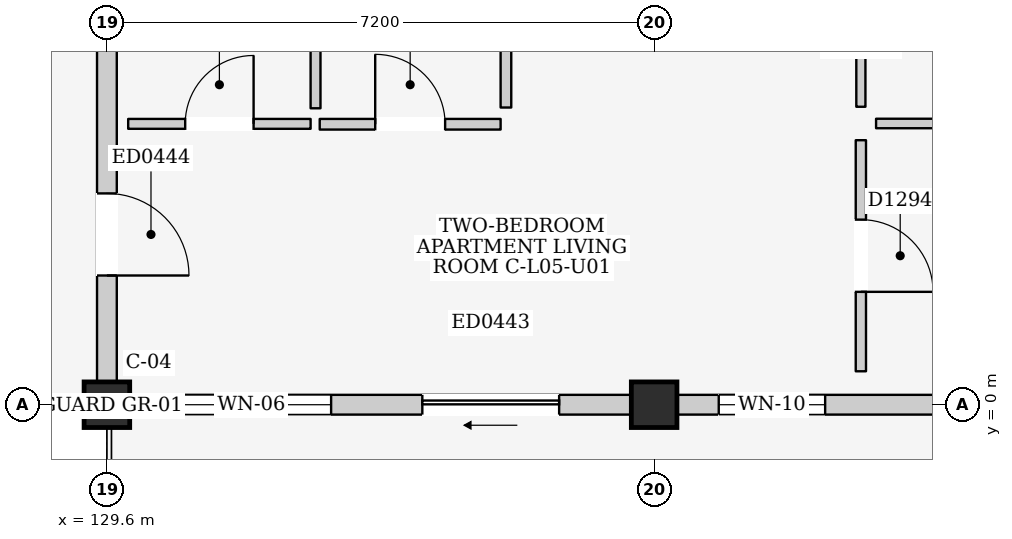
"""IFC4 building model, lengths in metres.
Left out: names, types, materials, properties, quantities, classifications, styles, units other than length and angle.
Written with IfcOpenShell. Run it as: python <this file> out.ifc"""

import sys

from ifc_helpers import new_model, si_unit, direction, frame, frame_2d, origin, origin_2d, place, context, subcontext, project, spatial, rectangle, extrude, element, fill, save


model = new_model("IFC4")
c1 = context("Model", 3, precision=1e-05, world=origin(), true_north=direction((0.0, 1.0)))
c2 = subcontext(c1, "Body", "Model", "MODEL_VIEW")
j1 = project(units=[si_unit("LENGTHUNIT", "METRE"), si_unit("PLANEANGLEUNIT", "RADIAN")], contexts=[c1])
p1 = place(None, origin())
s1 = spatial("IfcSite", under=j1, at=p1, CompositionType="ELEMENT")
p2 = place(p1, origin())
s2 = spatial("IfcBuilding", under=s1, at=p2, CompositionType="ELEMENT")
p3 = place(p2, frame((0.0, 0.0, 18.6)))
s3 = spatial("IfcBuildingStorey", under=s2, at=p3, CompositionType="ELEMENT", Elevation=18.6)
for number, where, z_axis, x_axis in (
    (1, (129.6, 0.0, 0.0), (0.0, 0.0, 1.0), (1.0, 0.0, 0.0)),
    (2, (136.8, 0.0, 0.0), (0.0, 0.0, 1.0), (1.0, 0.0, 0.0)),
):
    element("IfcColumn", number, at=place(p3, frame(where, z_axis=z_axis, x_axis=x_axis)), inside=s3, PredefinedType="COLUMN", context=c2, shape_type="SweptSolid", body=[
        extrude(rectangle(XDim=0.6, YDim=0.6, at=origin_2d()), origin(), (0.0, 0.0, 1.0), 3.3),
    ])
p4 = place(p3, frame((129.9, 0.0, 0.0), z_axis=(0.0, 0.0, 1.0), x_axis=(1.0, 0.0, 0.0)))
e3 = element("IfcWall", 3, at=p4, inside=s3, PredefinedType="ELEMENTEDWALL", context=c2, shape_type="SweptSolid", body=[
    extrude(rectangle(XDim=6.6, YDim=0.26, at=frame_2d((3.3, 0.0))), origin(), (0.0, 0.0, 1.0), 2.595),
])
p5 = place(p4, frame((3.85, 0.0, 0.0)))
e4 = element("IfcOpeningElement", 4, at=p5, cuts=e3, PredefinedType="OPENING", context=c2, shape_type="SweptSolid", body=[
    extrude(rectangle(XDim=1.8, YDim=2.12, at=frame_2d((0.9, 1.06))), frame((0.0, 0.145, 0.0), z_axis=(0.0, -1.0, 0.0), x_axis=(1.0, 0.0, 0.0)), (0.0, 0.0, 1.0), 0.29),
])
p6 = place(p4, frame((0.55, 0.0, 0.835)))
e5 = element("IfcOpeningElement", 5, at=p6, cuts=e3, PredefinedType="OPENING", context=c2, shape_type="SweptSolid", body=[
    extrude(rectangle(XDim=2.1, YDim=1.65, at=frame_2d((1.05, 0.825))), frame((0.0, 0.145, 0.0), z_axis=(0.0, -1.0, 0.0), x_axis=(1.0, 0.0, 0.0)), (0.0, 0.0, 1.0), 0.29),
])
p7 = place(p3, frame((129.6, 0.3, 0.0), z_axis=(0.0, 0.0, 1.0), x_axis=(0.0, 1.0, 0.0)))
e6 = element("IfcWall", 6, at=p7, inside=s3, PredefinedType="ELEMENTEDWALL", context=c2, shape_type="SweptSolid", body=[
    extrude(rectangle(XDim=6.6, YDim=0.26, at=frame_2d((3.3, 0.0))), origin(), (0.0, 0.0, 1.0), 2.545),
])
p8 = place(p7, frame((1.4, 0.0, 0.0)))
e7 = element("IfcOpeningElement", 7, at=p8, cuts=e6, PredefinedType="OPENING", context=c2, shape_type="SweptSolid", body=[
    extrude(rectangle(XDim=1.08, YDim=2.12, at=frame_2d((0.54, 1.06))), frame((0.0, 0.145, 0.0), z_axis=(0.0, -1.0, 0.0), x_axis=(1.0, 0.0, 0.0)), (0.0, 0.0, 1.0), 0.29),
])
p9 = place(p7, frame((4.4, 0.0, 0.95)))
e8 = element("IfcOpeningElement", 8, at=p9, cuts=e6, PredefinedType="OPENING", context=c2, shape_type="SweptSolid", body=[
    extrude(rectangle(XDim=1.2, YDim=1.35, at=frame_2d((0.6, 0.675))), frame((0.0, 0.145, 0.0), z_axis=(0.0, -1.0, 0.0), x_axis=(1.0, 0.0, 0.0)), (0.0, 0.0, 1.0), 0.29),
])
p10 = place(p3, frame((137.1, 0.0, 0.0), z_axis=(0.0, 0.0, 1.0), x_axis=(1.0, 0.0, 0.0)))
e9 = element("IfcWall", 9, at=p10, inside=s3, PredefinedType="ELEMENTEDWALL", context=c2, shape_type="SweptSolid", body=[
    extrude(rectangle(XDim=6.6, YDim=0.26, at=frame_2d((3.3, 0.0))), origin(), (0.0, 0.0, 1.0), 2.595),
])
p11 = place(p10, frame((3.85, 0.0, 0.0)))
e10 = element("IfcOpeningElement", 10, at=p11, cuts=e9, PredefinedType="OPENING", context=c2, shape_type="SweptSolid", body=[
    extrude(rectangle(XDim=1.6, YDim=2.12, at=frame_2d((0.8, 1.06))), frame((0.0, 0.145, 0.0), z_axis=(0.0, -1.0, 0.0), x_axis=(1.0, 0.0, 0.0)), (0.0, 0.0, 1.0), 0.29),
])
p12 = place(p10, frame((0.55, 0.0, 0.9)))
e11 = element("IfcOpeningElement", 11, at=p12, cuts=e9, PredefinedType="OPENING", context=c2, shape_type="SweptSolid", body=[
    extrude(rectangle(XDim=1.4, YDim=1.2, at=frame_2d((0.7, 0.6))), frame((0.0, 0.145, 0.0), z_axis=(0.0, -1.0, 0.0), x_axis=(1.0, 0.0, 0.0)), (0.0, 0.0, 1.0), 0.29),
])
p13 = place(p3, frame((129.88, 3.695, 0.0), z_axis=(0.0, 0.0, 1.0), x_axis=(1.0, 0.0, 0.0)))
e12 = element("IfcWall", 12, at=p13, inside=s3, PredefinedType="PARTITIONING", context=c2, shape_type="SweptSolid", body=[
    extrude(rectangle(XDim=2.4, YDim=0.13, at=frame_2d((1.2, 0.0))), origin(), (0.0, 0.0, 1.0), 3.06),
])
p14 = place(p13, frame((0.75, 0.0, 0.0)))
e13 = element("IfcOpeningElement", 13, at=p14, cuts=e12, PredefinedType="OPENING", context=c2, shape_type="SweptSolid", body=[
    extrude(rectangle(XDim=0.9, YDim=2.1, at=frame_2d((0.45, 1.05))), frame((0.0, 0.08, 0.0), z_axis=(0.0, -1.0, 0.0), x_axis=(1.0, 0.0, 0.0)), (0.0, 0.0, 1.0), 0.16),
])
p15 = place(p3, frame((132.345, 3.9, 0.0), z_axis=(0.0, 0.0, 1.0), x_axis=(0.0, 1.0, 0.0)))
e14 = element("IfcWall", 14, at=p15, inside=s3, PredefinedType="PARTITIONING", context=c2, shape_type="SweptSolid", body=[
    extrude(rectangle(XDim=3.04, YDim=0.13, at=frame_2d((1.52, 0.0))), origin(), (0.0, 0.0, 1.0), 3.06),
])
p16 = place(p3, frame((132.4, 3.69, 0.0), z_axis=(0.0, 0.0, 1.0), x_axis=(1.0, 0.0, 0.0)))
e15 = element("IfcWall", 15, at=p16, inside=s3, PredefinedType="PARTITIONING", context=c2, shape_type="SweptSolid", body=[
    extrude(rectangle(XDim=2.38, YDim=0.14, at=frame_2d((1.19, 0.0))), origin(), (0.0, 0.0, 1.0), 3.06),
])
p17 = place(p16, frame((0.73, 0.0, 0.0)))
e16 = element("IfcOpeningElement", 16, at=p17, cuts=e15, PredefinedType="OPENING", context=c2, shape_type="SweptSolid", body=[
    extrude(rectangle(XDim=0.92, YDim=2.1, at=frame_2d((0.46, 1.05))), frame((0.0, 0.085, 0.0), z_axis=(0.0, -1.0, 0.0), x_axis=(1.0, 0.0, 0.0)), (0.0, 0.0, 1.0), 0.17),
])
p18 = place(p3, frame((134.85, 3.91, 0.0), z_axis=(0.0, 0.0, 1.0), x_axis=(0.0, 1.0, 0.0)))
e17 = element("IfcWall", 17, at=p18, inside=s3, PredefinedType="PARTITIONING", context=c2, shape_type="SweptSolid", body=[
    extrude(rectangle(XDim=3.06, YDim=0.14, at=frame_2d((1.53, 0.0))), origin(), (0.0, 0.0, 1.0), 3.06),
])
p19 = place(p3, frame((139.52, 0.44, 0.0), z_axis=(0.0, 0.0, 1.0), x_axis=(0.0, 1.0, 0.0)))
e18 = element("IfcWall", 18, at=p19, inside=s3, PredefinedType="PARTITIONING", context=c2, shape_type="SweptSolid", body=[
    extrude(rectangle(XDim=3.04, YDim=0.135, at=frame_2d((1.52, 0.0))), origin(), (0.0, 0.0, 1.0), 3.06),
])
p20 = place(p19, frame((1.045, 0.0, 0.0)))
e19 = element("IfcOpeningElement", 19, at=p20, cuts=e18, PredefinedType="OPENING", context=c2, shape_type="SweptSolid", body=[
    extrude(rectangle(XDim=0.95, YDim=2.15, at=frame_2d((0.475, 1.075))), frame((0.0, 0.083, 0.0), z_axis=(0.0, -1.0, 0.0), x_axis=(1.0, 0.0, 0.0)), (0.0, 0.0, 1.0), 0.165),
])
p21 = place(p3, frame((139.72, 3.7, 0.0), z_axis=(0.0, 0.0, 1.0), x_axis=(1.0, 0.0, 0.0)))
e20 = element("IfcWall", 20, at=p21, inside=s3, PredefinedType="PARTITIONING", context=c2, shape_type="SweptSolid", body=[
    extrude(rectangle(XDim=4.06, YDim=0.125, at=frame_2d((2.03, 0.0))), origin(), (0.0, 0.0, 1.0), 3.06),
])
p22 = place(p3, frame((139.52, 3.92, 0.0), z_axis=(0.0, 0.0, 1.0), x_axis=(0.0, 1.0, 0.0)))
e21 = element("IfcWall", 21, at=p22, inside=s3, PredefinedType="PARTITIONING", context=c2, shape_type="SweptSolid", body=[
    extrude(rectangle(XDim=3.04, YDim=0.12, at=frame_2d((1.52, 0.0))), origin(), (0.0, 0.0, 1.0), 3.06),
])
p23 = place(p22, frame((1.04, 0.0, 0.0)))
e22 = element("IfcOpeningElement", 22, at=p23, cuts=e21, PredefinedType="OPENING", context=c2, shape_type="SweptSolid", body=[
    extrude(rectangle(XDim=0.96, YDim=2.15, at=frame_2d((0.48, 1.075))), frame((0.0, 0.075, 0.0), z_axis=(0.0, -1.0, 0.0), x_axis=(1.0, 0.0, 0.0)), (0.0, 0.0, 1.0), 0.15),
])
p24 = place(p5, frame((1.8, 0.0, 0.0), z_axis=(0.0, 0.0, 1.0), x_axis=(-1.0, 0.0, 0.0)))
e23 = element("IfcDoor", 23, at=p24, inside=s3, OperationType="SLIDING_TO_LEFT", PredefinedType="DOOR", context=c2, shape_type="SweptSolid", body=[
    extrude(rectangle(XDim=1.8, YDim=2.12, at=frame_2d((0.9, 1.06))), frame((0.0, 0.025, 0.0), z_axis=(0.0, -1.0, 0.0), x_axis=(1.0, 0.0, 0.0)), (0.0, 0.0, 1.0), 0.05),
])
fill(e4, e23)
p25 = place(p6, origin())
e24 = element("IfcWindow", 24, at=p25, inside=s3, PartitioningType="DOUBLE_PANEL_VERTICAL", PredefinedType="WINDOW", context=c2, shape_type="SweptSolid", body=[
    extrude(rectangle(XDim=2.1, YDim=1.65, at=frame_2d((1.05, 0.825))), frame((0.0, 0.03, 0.0), z_axis=(0.0, -1.0, 0.0), x_axis=(1.0, 0.0, 0.0)), (0.0, 0.0, 1.0), 0.06),
])
fill(e5, e24)
p26 = place(p8, frame((1.08, 0.0, 0.0), z_axis=(0.0, 0.0, 1.0), x_axis=(-1.0, 0.0, 0.0)))
e25 = element("IfcDoor", 25, at=p26, inside=s3, OperationType="SINGLE_SWING_RIGHT", PredefinedType="DOOR", context=c2, shape_type="SweptSolid", body=[
    extrude(rectangle(XDim=1.08, YDim=2.12, at=frame_2d((0.54, 1.06))), frame((0.0, 0.025, 0.0), z_axis=(0.0, -1.0, 0.0), x_axis=(1.0, 0.0, 0.0)), (0.0, 0.0, 1.0), 0.05),
])
fill(e7, e25)
p27 = place(p12, origin())
e26 = element("IfcWindow", 26, at=p27, inside=s3, PartitioningType="DOUBLE_PANEL_HORIZONTAL", PredefinedType="WINDOW", context=c2, shape_type="SweptSolid", body=[
    extrude(rectangle(XDim=1.4, YDim=1.2, at=frame_2d((0.7, 0.6))), frame((0.0, 0.03, 0.0), z_axis=(0.0, -1.0, 0.0), x_axis=(1.0, 0.0, 0.0)), (0.0, 0.0, 1.0), 0.06),
])
fill(e11, e26)
p28 = place(p14, origin())
e27 = element("IfcDoor", 27, at=p28, inside=s3, OperationType="SINGLE_SWING_RIGHT", PredefinedType="DOOR", context=c2, shape_type="SweptSolid", body=[
    extrude(rectangle(XDim=0.9, YDim=2.1, at=frame_2d((0.45, 1.05))), frame((0.0, 0.025, 0.0), z_axis=(0.0, -1.0, 0.0), x_axis=(1.0, 0.0, 0.0)), (0.0, 0.0, 1.0), 0.05),
])
fill(e13, e27)
p29 = place(p17, origin())
e28 = element("IfcDoor", 28, at=p29, inside=s3, OperationType="SINGLE_SWING_LEFT", PredefinedType="DOOR", context=c2, shape_type="SweptSolid", body=[
    extrude(rectangle(XDim=0.92, YDim=2.1, at=frame_2d((0.46, 1.05))), frame((0.0, 0.025, 0.0), z_axis=(0.0, -1.0, 0.0), x_axis=(1.0, 0.0, 0.0)), (0.0, 0.0, 1.0), 0.05),
])
fill(e16, e28)
p30 = place(p20, frame((0.95, 0.0, 0.0), z_axis=(0.0, 0.0, 1.0), x_axis=(-1.0, 0.0, 0.0)))
e29 = element("IfcDoor", 29, at=p30, inside=s3, OperationType="SINGLE_SWING_RIGHT", PredefinedType="DOOR", context=c2, shape_type="SweptSolid", body=[
    extrude(rectangle(XDim=0.95, YDim=2.15, at=frame_2d((0.475, 1.075))), frame((0.0, 0.025, 0.0), z_axis=(0.0, -1.0, 0.0), x_axis=(1.0, 0.0, 0.0)), (0.0, 0.0, 1.0), 0.05),
])
fill(e19, e29)
save(model, sys.argv[1])
